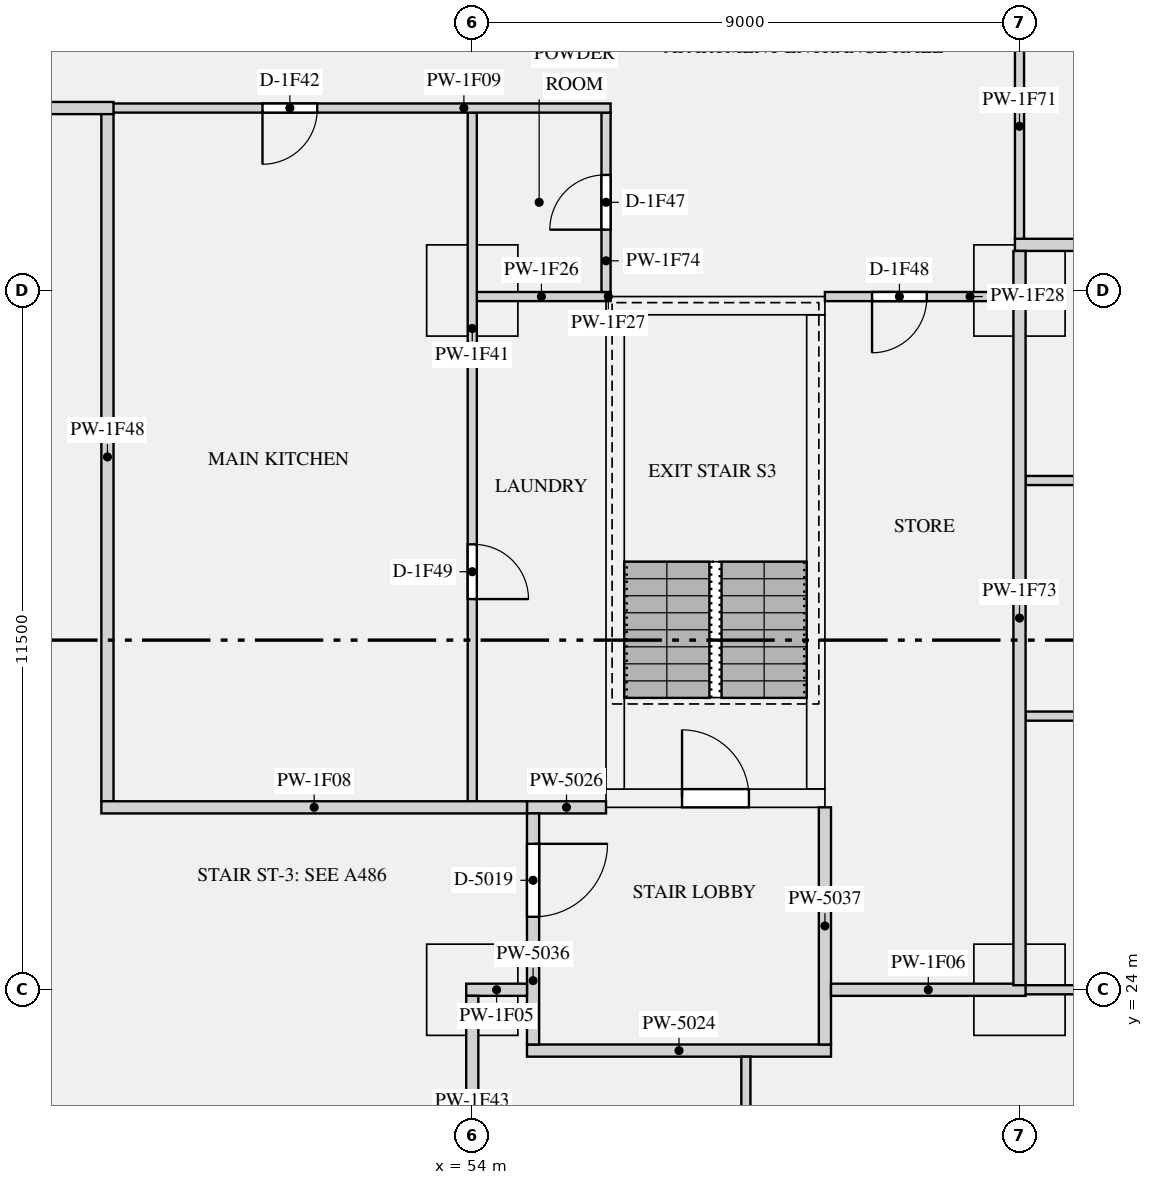
"""IFC4 building model, lengths in metres.
Left out: names, types, materials, properties, quantities, classifications, styles, units other than length and angle.
Written with IfcOpenShell. Run it as: python <this file> out.ifc"""

import sys

from ifc_helpers import new_model, si_unit, direction, frame, frame_2d, origin, origin_2d, place, context, subcontext, project, spatial, rectangle, extrude, element, fill, save


model = new_model("IFC4")
c1 = context("Model", 3, precision=1e-05, world=origin(), true_north=direction((0.0, 1.0)))
c2 = subcontext(c1, "Body", "Model", "MODEL_VIEW")
j1 = project(units=[si_unit("LENGTHUNIT", "METRE"), si_unit("PLANEANGLEUNIT", "RADIAN")], contexts=[c1])
p1 = place(None, origin())
s1 = spatial("IfcSite", under=j1, at=p1, CompositionType="ELEMENT")
p2 = place(p1, origin())
s2 = spatial("IfcBuilding", under=s1, at=p2, CompositionType="ELEMENT")
p3 = place(p2, frame((0.0, 0.0, 60.45)))
s3 = spatial("IfcBuildingStorey", under=s2, at=p3, CompositionType="ELEMENT", Elevation=60.45)
for number, where, z_axis, x_axis in (
    (1, (54.0, 24.0, 0.0), (0.0, 0.0, 1.0), (1.0, 0.0, 0.0)),
    (2, (63.0, 24.0, 0.0), (0.0, 0.0, 1.0), (1.0, 0.0, 0.0)),
    (3, (54.0, 35.5, 0.0), (0.0, 0.0, 1.0), (1.0, 0.0, 0.0)),
    (4, (63.0, 35.5, 0.0), (0.0, 0.0, 1.0), (1.0, 0.0, 0.0)),
):
    element("IfcColumn", number, at=place(p3, frame(where, z_axis=z_axis, x_axis=x_axis)), inside=s3, PredefinedType="COLUMN", context=c2, shape_type="SweptSolid", body=[
        extrude(rectangle(XDim=1.5, YDim=1.5, at=origin_2d()), origin(), (0.0, 0.0, 1.0), 3.15),
    ])
p4 = place(p3, frame((56.2, 27.15, 0.0), z_axis=(0.0, 0.0, 1.0), x_axis=(1.0, 0.0, 0.0)))
e5 = element("IfcWall", 5, at=p4, inside=s3, PredefinedType="SHEAR", context=c2, shape_type="SweptSolid", body=[
    extrude(rectangle(XDim=3.6, YDim=0.3, at=frame_2d((1.8, 0.0))), origin(), (0.0, 0.0, 1.0), 3.15),
])
p5 = place(p4, frame((1.25, 0.0, 0.0)))
e6 = element("IfcOpeningElement", 6, at=p5, cuts=e5, PredefinedType="OPENING", context=c2, shape_type="SweptSolid", body=[
    extrude(rectangle(XDim=1.1, YDim=2.1, at=frame_2d((0.55, 1.05))), frame((0.0, 0.16, 0.0), z_axis=(0.0, -1.0, 0.0), x_axis=(1.0, 0.0, 0.0)), (0.0, 0.0, 1.0), 0.32),
])
p6 = place(p3, frame((56.2, 35.25, 0.0), z_axis=(0.0, 0.0, 1.0), x_axis=(1.0, 0.0, 0.0)))
e7 = element("IfcWall", 7, at=p6, inside=s3, PredefinedType="SHEAR", context=c2, shape_type="SweptSolid", body=[
    extrude(rectangle(XDim=3.6, YDim=0.3, at=frame_2d((1.8, 0.0))), origin(), (0.0, 0.0, 1.0), 3.15),
])
for number, where, z_axis, x_axis in (
    (8, (56.35, 27.3, 0.0), (0.0, 0.0, 1.0), (0.0, 1.0, 0.0)),
    (9, (59.65, 27.3, 0.0), (0.0, 0.0, 1.0), (0.0, 1.0, 0.0)),
):
    element("IfcWall", number, at=place(p3, frame(where, z_axis=z_axis, x_axis=x_axis)), inside=s3, PredefinedType="SHEAR", context=c2, shape_type="SweptSolid", body=[
        extrude(rectangle(XDim=7.8, YDim=0.3, at=frame_2d((3.9, 0.0))), origin(), (0.0, 0.0, 1.0), 3.15),
    ])
p7 = place(p3, frame((54.9, 23.0, 0.0), z_axis=(0.0, 0.0, 1.0), x_axis=(1.0, 0.0, 0.0)))
e10 = element("IfcWall", 10, at=p7, inside=s3, PredefinedType="PARTITIONING", context=c2, shape_type="SweptSolid", body=[
    extrude(rectangle(XDim=5.0, YDim=0.2, at=frame_2d((2.5, 0.0))), origin(), (0.0, 0.0, 1.0), 2.83),
])
p8 = place(p3, frame((54.9, 27.0, 0.0), z_axis=(0.0, 0.0, 1.0), x_axis=(1.0, 0.0, 0.0)))
e11 = element("IfcWall", 11, at=p8, inside=s3, PredefinedType="PARTITIONING", context=c2, shape_type="SweptSolid", body=[
    extrude(rectangle(XDim=1.3, YDim=0.2, at=frame_2d((0.65, 0.0))), origin(), (0.0, 0.0, 1.0), 2.83),
])
p9 = place(p3, frame((55.0, 23.1, 0.0), z_axis=(0.0, 0.0, 1.0), x_axis=(0.0, 1.0, 0.0)))
e12 = element("IfcWall", 12, at=p9, inside=s3, PredefinedType="PARTITIONING", context=c2, shape_type="SweptSolid", body=[
    extrude(rectangle(XDim=3.8, YDim=0.2, at=frame_2d((1.9, 0.0))), origin(), (0.0, 0.0, 1.0), 2.83),
])
p10 = place(p9, frame((2.1, 0.0, 0.0)))
e13 = element("IfcOpeningElement", 13, at=p10, cuts=e12, PredefinedType="OPENING", context=c2, shape_type="SweptSolid", body=[
    extrude(rectangle(XDim=1.2, YDim=2.1, at=frame_2d((0.6, 1.05))), frame((0.0, 0.11, 0.0), z_axis=(0.0, -1.0, 0.0), x_axis=(1.0, 0.0, 0.0)), (0.0, 0.0, 1.0), 0.22),
])
p11 = place(p3, frame((59.8, 23.1, 0.0), z_axis=(0.0, 0.0, 1.0), x_axis=(0.0, 1.0, 0.0)))
e14 = element("IfcWall", 14, at=p11, inside=s3, PredefinedType="PARTITIONING", context=c2, shape_type="SweptSolid", body=[
    extrude(rectangle(XDim=3.9, YDim=0.2, at=frame_2d((1.95, 0.0))), origin(), (0.0, 0.0, 1.0), 2.83),
])
p12 = place(p3, frame((62.9, 24.0, 0.0), z_axis=(0.0, 0.0, 1.0), x_axis=(1.0, 0.0, 0.0)))
e15 = element("IfcWall", 15, at=p12, inside=s3, PredefinedType="PARTITIONING", context=c2, shape_type="SweptSolid", body=[
    extrude(rectangle(XDim=10.3, YDim=0.15, at=frame_2d((5.15, 0.0))), origin(), (0.0, 0.0, 1.0), 2.83),
])
p13 = place(p12, frame((2.275, 0.0, 0.0)))
e16 = element("IfcOpeningElement", 16, at=p13, cuts=e15, PredefinedType="OPENING", context=c2, shape_type="SweptSolid", body=[
    extrude(rectangle(XDim=0.9, YDim=2.1, at=frame_2d((0.45, 1.05))), frame((0.0, 0.085, 0.0), z_axis=(0.0, -1.0, 0.0), x_axis=(1.0, 0.0, 0.0)), (0.0, 0.0, 1.0), 0.17),
])
p14 = place(p12, frame((5.725, 0.0, 0.0)))
e17 = element("IfcOpeningElement", 17, at=p14, cuts=e15, PredefinedType="OPENING", context=c2, shape_type="SweptSolid", body=[
    extrude(rectangle(XDim=1.5, YDim=2.1, at=frame_2d((0.75, 1.05))), frame((0.0, 0.085, 0.0), z_axis=(0.0, -1.0, 0.0), x_axis=(1.0, 0.0, 0.0)), (0.0, 0.0, 1.0), 0.17),
])
p15 = place(p3, frame((53.9, 24.0, 0.0), z_axis=(0.0, 0.0, 1.0), x_axis=(1.0, 0.0, 0.0)))
e18 = element("IfcWall", 18, at=p15, inside=s3, PredefinedType="PARTITIONING", context=c2, shape_type="SweptSolid", body=[
    extrude(rectangle(XDim=1.0, YDim=0.2, at=frame_2d((0.5, 0.0))), origin(), (0.0, 0.0, 1.0), 2.83),
])
p16 = place(p3, frame((59.9, 24.0, 0.0), z_axis=(0.0, 0.0, 1.0), x_axis=(1.0, 0.0, 0.0)))
e19 = element("IfcWall", 19, at=p16, inside=s3, PredefinedType="PARTITIONING", context=c2, shape_type="SweptSolid", body=[
    extrude(rectangle(XDim=3.2, YDim=0.2, at=frame_2d((1.6, 0.0))), origin(), (0.0, 0.0, 1.0), 2.83),
])
p17 = place(p3, frame((47.9, 27.0, 0.0), z_axis=(0.0, 0.0, 1.0), x_axis=(1.0, 0.0, 0.0)))
e20 = element("IfcWall", 20, at=p17, inside=s3, PredefinedType="PARTITIONING", context=c2, shape_type="SweptSolid", body=[
    extrude(rectangle(XDim=7.0, YDim=0.2, at=frame_2d((3.5, 0.0))), origin(), (0.0, 0.0, 1.0), 2.83),
])
p18 = place(p3, frame((47.9, 38.5, 0.0), z_axis=(0.0, 0.0, 1.0), x_axis=(1.0, 0.0, 0.0)))
e21 = element("IfcWall", 21, at=p18, inside=s3, PredefinedType="PARTITIONING", context=c2, shape_type="SweptSolid", body=[
    extrude(rectangle(XDim=8.375, YDim=0.15, at=frame_2d((4.188, 0.0))), origin(), (0.0, 0.0, 1.0), 2.83),
])
p19 = place(p18, frame((2.65, 0.0, 0.0)))
e22 = element("IfcOpeningElement", 22, at=p19, cuts=e21, PredefinedType="OPENING", context=c2, shape_type="SweptSolid", body=[
    extrude(rectangle(XDim=0.9, YDim=2.1, at=frame_2d((0.45, 1.05))), frame((0.0, 0.085, 0.0), z_axis=(0.0, -1.0, 0.0), x_axis=(1.0, 0.0, 0.0)), (0.0, 0.0, 1.0), 0.17),
])
p20 = place(p3, frame((23.925, 38.5, 0.0), z_axis=(0.0, 0.0, 1.0), x_axis=(1.0, 0.0, 0.0)))
e23 = element("IfcWall", 23, at=p20, inside=s3, PredefinedType="PARTITIONING", context=c2, shape_type="SweptSolid", body=[
    extrude(rectangle(XDim=24.175, YDim=0.2, at=frame_2d((12.087, 0.0))), origin(), (0.0, 0.0, 1.0), 2.83),
])
p21 = place(p20, frame((19.525, 0.0, 0.0)))
e24 = element("IfcOpeningElement", 24, at=p21, cuts=e23, PredefinedType="OPENING", context=c2, shape_type="SweptSolid", body=[
    extrude(rectangle(XDim=1.1, YDim=2.1, at=frame_2d((0.55, 1.05))), frame((0.0, 0.11, 0.0), z_axis=(0.0, -1.0, 0.0), x_axis=(1.0, 0.0, 0.0)), (0.0, 0.0, 1.0), 0.22),
])
p22 = place(p3, frame((63.1, 32.375, 0.0), z_axis=(0.0, 0.0, 1.0), x_axis=(1.0, 0.0, 0.0)))
e25 = element("IfcWall", 25, at=p22, inside=s3, PredefinedType="PARTITIONING", context=c2, shape_type="SweptSolid", body=[
    extrude(rectangle(XDim=12.6, YDim=0.15, at=frame_2d((6.3, 0.0))), origin(), (0.0, 0.0, 1.0), 2.83),
])
p23 = place(p22, frame((5.575, 0.0, 0.0)))
e26 = element("IfcOpeningElement", 26, at=p23, cuts=e25, PredefinedType="OPENING", context=c2, shape_type="SweptSolid", body=[
    extrude(rectangle(XDim=1.5, YDim=2.1, at=frame_2d((0.75, 1.05))), frame((0.0, 0.085, 0.0), z_axis=(0.0, -1.0, 0.0), x_axis=(1.0, 0.0, 0.0)), (0.0, 0.0, 1.0), 0.17),
])
p24 = place(p3, frame((62.925, 36.25, 0.0), z_axis=(0.0, 0.0, 1.0), x_axis=(1.0, 0.0, 0.0)))
e27 = element("IfcWall", 27, at=p24, inside=s3, PredefinedType="PARTITIONING", context=c2, shape_type="SweptSolid", body=[
    extrude(rectangle(XDim=12.775, YDim=0.2, at=frame_2d((6.387, 0.0))), origin(), (0.0, 0.0, 1.0), 2.83),
])
p25 = place(p3, frame((54.075, 35.4, 0.0), z_axis=(0.0, 0.0, 1.0), x_axis=(1.0, 0.0, 0.0)))
e28 = element("IfcWall", 28, at=p25, inside=s3, PredefinedType="PARTITIONING", context=c2, shape_type="SweptSolid", body=[
    extrude(rectangle(XDim=2.125, YDim=0.15, at=frame_2d((1.062, 0.0))), origin(), (0.0, 0.0, 1.0), 2.83),
])
p26 = place(p3, frame((56.2, 35.4, 0.0), z_axis=(0.0, 0.0, 1.0), x_axis=(1.0, 0.0, 0.0)))
e29 = element("IfcWall", 29, at=p26, inside=s3, PredefinedType="PARTITIONING", context=c2, shape_type="SweptSolid", body=[
    extrude(rectangle(XDim=0.075, YDim=0.15, at=frame_2d((0.038, 0.0))), origin(), (0.0, 0.0, 1.0), 2.83),
])
p27 = place(p3, frame((59.8, 35.4, 0.0), z_axis=(0.0, 0.0, 1.0), x_axis=(1.0, 0.0, 0.0)))
e30 = element("IfcWall", 30, at=p27, inside=s3, PredefinedType="PARTITIONING", context=c2, shape_type="SweptSolid", body=[
    extrude(rectangle(XDim=3.1, YDim=0.15, at=frame_2d((1.55, 0.0))), origin(), (0.0, 0.0, 1.0), 2.83),
])
p28 = place(p27, frame((0.775, 0.0, 0.0)))
e31 = element("IfcOpeningElement", 31, at=p28, cuts=e30, PredefinedType="OPENING", context=c2, shape_type="SweptSolid", body=[
    extrude(rectangle(XDim=0.9, YDim=2.1, at=frame_2d((0.45, 1.05))), frame((0.0, 0.085, 0.0), z_axis=(0.0, -1.0, 0.0), x_axis=(1.0, 0.0, 0.0)), (0.0, 0.0, 1.0), 0.17),
])
p29 = place(p3, frame((63.1, 28.5, 0.0), z_axis=(0.0, 0.0, 1.0), x_axis=(1.0, 0.0, 0.0)))
e32 = element("IfcWall", 32, at=p29, inside=s3, PredefinedType="PARTITIONING", context=c2, shape_type="SweptSolid", body=[
    extrude(rectangle(XDim=10.1, YDim=0.15, at=frame_2d((5.05, 0.0))), origin(), (0.0, 0.0, 1.0), 2.83),
])
p30 = place(p29, frame((4.325, 0.0, 0.0)))
e33 = element("IfcOpeningElement", 33, at=p30, cuts=e32, PredefinedType="OPENING", context=c2, shape_type="SweptSolid", body=[
    extrude(rectangle(XDim=1.5, YDim=2.1, at=frame_2d((0.75, 1.05))), frame((0.0, 0.085, 0.0), z_axis=(0.0, -1.0, 0.0), x_axis=(1.0, 0.0, 0.0)), (0.0, 0.0, 1.0), 0.17),
])
p31 = place(p3, frame((54.0, 27.1, 0.0), z_axis=(0.0, 0.0, 1.0), x_axis=(0.0, 1.0, 0.0)))
e34 = element("IfcWall", 34, at=p31, inside=s3, PredefinedType="PARTITIONING", context=c2, shape_type="SweptSolid", body=[
    extrude(rectangle(XDim=11.325, YDim=0.15, at=frame_2d((5.663, 0.0))), origin(), (0.0, 0.0, 1.0), 2.83),
])
p32 = place(p31, frame((3.325, 0.0, 0.0)))
e35 = element("IfcOpeningElement", 35, at=p32, cuts=e34, PredefinedType="OPENING", context=c2, shape_type="SweptSolid", body=[
    extrude(rectangle(XDim=0.9, YDim=2.1, at=frame_2d((0.45, 1.05))), frame((0.0, 0.085, 0.0), z_axis=(0.0, -1.0, 0.0), x_axis=(1.0, 0.0, 0.0)), (0.0, 0.0, 1.0), 0.17),
])
p33 = place(p3, frame((54.0, 16.1, 0.0), z_axis=(0.0, 0.0, 1.0), x_axis=(0.0, 1.0, 0.0)))
e36 = element("IfcWall", 36, at=p33, inside=s3, PredefinedType="PARTITIONING", context=c2, shape_type="SweptSolid", body=[
    extrude(rectangle(XDim=7.8, YDim=0.2, at=frame_2d((3.9, 0.0))), origin(), (0.0, 0.0, 1.0), 2.83),
])
p34 = place(p33, frame((2.35, 0.0, 0.0)))
e37 = element("IfcOpeningElement", 37, at=p34, cuts=e36, PredefinedType="OPENING", context=c2, shape_type="SweptSolid", body=[
    extrude(rectangle(XDim=1.1, YDim=2.1, at=frame_2d((0.55, 1.05))), frame((0.0, 0.11, 0.0), z_axis=(0.0, -1.0, 0.0), x_axis=(1.0, 0.0, 0.0)), (0.0, 0.0, 1.0), 0.22),
])
p35 = place(p3, frame((48.0, 27.1, 0.0), z_axis=(0.0, 0.0, 1.0), x_axis=(0.0, 1.0, 0.0)))
e38 = element("IfcWall", 38, at=p35, inside=s3, PredefinedType="PARTITIONING", context=c2, shape_type="SweptSolid", body=[
    extrude(rectangle(XDim=11.325, YDim=0.2, at=frame_2d((5.663, 0.0))), origin(), (0.0, 0.0, 1.0), 2.83),
])
p36 = place(p3, frame((63.0, 36.35, 0.0), z_axis=(0.0, 0.0, 1.0), x_axis=(0.0, 1.0, 0.0)))
e39 = element("IfcWall", 39, at=p36, inside=s3, PredefinedType="PARTITIONING", context=c2, shape_type="SweptSolid", body=[
    extrude(rectangle(XDim=3.7, YDim=0.15, at=frame_2d((1.85, 0.0))), origin(), (0.0, 0.0, 1.0), 2.83),
])
p37 = place(p3, frame((63.0, 24.075, 0.0), z_axis=(0.0, 0.0, 1.0), x_axis=(0.0, 1.0, 0.0)))
e40 = element("IfcWall", 40, at=p37, inside=s3, PredefinedType="PARTITIONING", context=c2, shape_type="SweptSolid", body=[
    extrude(rectangle(XDim=12.075, YDim=0.2, at=frame_2d((6.038, 0.0))), origin(), (0.0, 0.0, 1.0), 2.83),
])
p38 = place(p3, frame((56.2, 35.475, 0.0), z_axis=(0.0, 0.0, 1.0), x_axis=(0.0, 1.0, 0.0)))
e41 = element("IfcWall", 41, at=p38, inside=s3, PredefinedType="PARTITIONING", context=c2, shape_type="SweptSolid", body=[
    extrude(rectangle(XDim=2.95, YDim=0.15, at=frame_2d((1.475, 0.0))), origin(), (0.0, 0.0, 1.0), 2.83),
])
p39 = place(p38, frame((1.025, 0.0, 0.0)))
e42 = element("IfcOpeningElement", 42, at=p39, cuts=e41, PredefinedType="OPENING", context=c2, shape_type="SweptSolid", body=[
    extrude(rectangle(XDim=0.9, YDim=2.1, at=frame_2d((0.45, 1.05))), frame((0.0, 0.085, 0.0), z_axis=(0.0, -1.0, 0.0), x_axis=(1.0, 0.0, 0.0)), (0.0, 0.0, 1.0), 0.17),
])
p40 = place(p3, frame((58.5, 12.575, 0.0), z_axis=(0.0, 0.0, 1.0), x_axis=(0.0, 1.0, 0.0)))
e43 = element("IfcWall", 43, at=p40, inside=s3, PredefinedType="PARTITIONING", context=c2, shape_type="SweptSolid", body=[
    extrude(rectangle(XDim=10.325, YDim=0.15, at=frame_2d((5.163, 0.0))), origin(), (0.0, 0.0, 1.0), 2.83),
])
p41 = place(p40, frame((1.475, 0.0, 0.0)))
e44 = element("IfcOpeningElement", 44, at=p41, cuts=e43, PredefinedType="OPENING", context=c2, shape_type="SweptSolid", body=[
    extrude(rectangle(XDim=0.9, YDim=2.1, at=frame_2d((0.45, 1.05))), frame((0.0, 0.085, 0.0), z_axis=(0.0, -1.0, 0.0), x_axis=(1.0, 0.0, 0.0)), (0.0, 0.0, 1.0), 0.17),
])
p42 = place(p40, frame((6.75, 0.0, 0.0)))
e45 = element("IfcOpeningElement", 45, at=p42, cuts=e43, PredefinedType="OPENING", context=c2, shape_type="SweptSolid", body=[
    extrude(rectangle(XDim=0.9, YDim=2.1, at=frame_2d((0.45, 1.05))), frame((0.0, 0.085, 0.0), z_axis=(0.0, -1.0, 0.0), x_axis=(1.0, 0.0, 0.0)), (0.0, 0.0, 1.0), 0.17),
])
p43 = place(p5, origin())
e46 = element("IfcDoor", 46, at=p43, inside=s3, OperationType="SINGLE_SWING_LEFT", PredefinedType="DOOR", context=c2, shape_type="SweptSolid", body=[
    extrude(rectangle(XDim=1.1, YDim=2.1, at=frame_2d((0.55, 1.05))), frame((0.0, 0.025, 0.0), z_axis=(0.0, -1.0, 0.0), x_axis=(1.0, 0.0, 0.0)), (0.0, 0.0, 1.0), 0.05),
])
fill(e6, e46)
p44 = place(p10, frame((1.2, 0.0, 0.0), z_axis=(0.0, 0.0, 1.0), x_axis=(-1.0, 0.0, 0.0)))
e47 = element("IfcDoor", 47, at=p44, inside=s3, OperationType="SINGLE_SWING_LEFT", PredefinedType="DOOR", context=c2, shape_type="SweptSolid", body=[
    extrude(rectangle(XDim=1.2, YDim=2.1, at=frame_2d((0.6, 1.05))), frame((0.0, 0.025, 0.0), z_axis=(0.0, -1.0, 0.0), x_axis=(1.0, 0.0, 0.0)), (0.0, 0.0, 1.0), 0.05),
])
fill(e13, e47)
p45 = place(p19, frame((0.9, 0.0, 0.0), z_axis=(0.0, 0.0, 1.0), x_axis=(-1.0, 0.0, 0.0)))
e48 = element("IfcDoor", 48, at=p45, inside=s3, OperationType="SINGLE_SWING_RIGHT", PredefinedType="DOOR", context=c2, shape_type="SweptSolid", body=[
    extrude(rectangle(XDim=0.9, YDim=2.1, at=frame_2d((0.45, 1.05))), frame((0.0, 0.025, 0.0), z_axis=(0.0, -1.0, 0.0), x_axis=(1.0, 0.0, 0.0)), (0.0, 0.0, 1.0), 0.05),
])
fill(e22, e48)
p46 = place(p39, origin())
e49 = element("IfcDoor", 49, at=p46, inside=s3, OperationType="SINGLE_SWING_LEFT", PredefinedType="DOOR", context=c2, shape_type="SweptSolid", body=[
    extrude(rectangle(XDim=0.9, YDim=2.1, at=frame_2d((0.45, 1.05))), frame((0.0, 0.025, 0.0), z_axis=(0.0, -1.0, 0.0), x_axis=(1.0, 0.0, 0.0)), (0.0, 0.0, 1.0), 0.05),
])
fill(e42, e49)
p47 = place(p28, frame((0.9, 0.0, 0.0), z_axis=(0.0, 0.0, 1.0), x_axis=(-1.0, 0.0, 0.0)))
e50 = element("IfcDoor", 50, at=p47, inside=s3, OperationType="SINGLE_SWING_RIGHT", PredefinedType="DOOR", context=c2, shape_type="SweptSolid", body=[
    extrude(rectangle(XDim=0.9, YDim=2.1, at=frame_2d((0.45, 1.05))), frame((0.0, 0.025, 0.0), z_axis=(0.0, -1.0, 0.0), x_axis=(1.0, 0.0, 0.0)), (0.0, 0.0, 1.0), 0.05),
])
fill(e31, e50)
p48 = place(p32, frame((0.9, 0.0, 0.0), z_axis=(0.0, 0.0, 1.0), x_axis=(-1.0, 0.0, 0.0)))
e51 = element("IfcDoor", 51, at=p48, inside=s3, OperationType="SINGLE_SWING_RIGHT", PredefinedType="DOOR", context=c2, shape_type="SweptSolid", body=[
    extrude(rectangle(XDim=0.9, YDim=2.1, at=frame_2d((0.45, 1.05))), frame((0.0, 0.025, 0.0), z_axis=(0.0, -1.0, 0.0), x_axis=(1.0, 0.0, 0.0)), (0.0, 0.0, 1.0), 0.05),
])
fill(e35, e51)
save(model, sys.argv[1])
